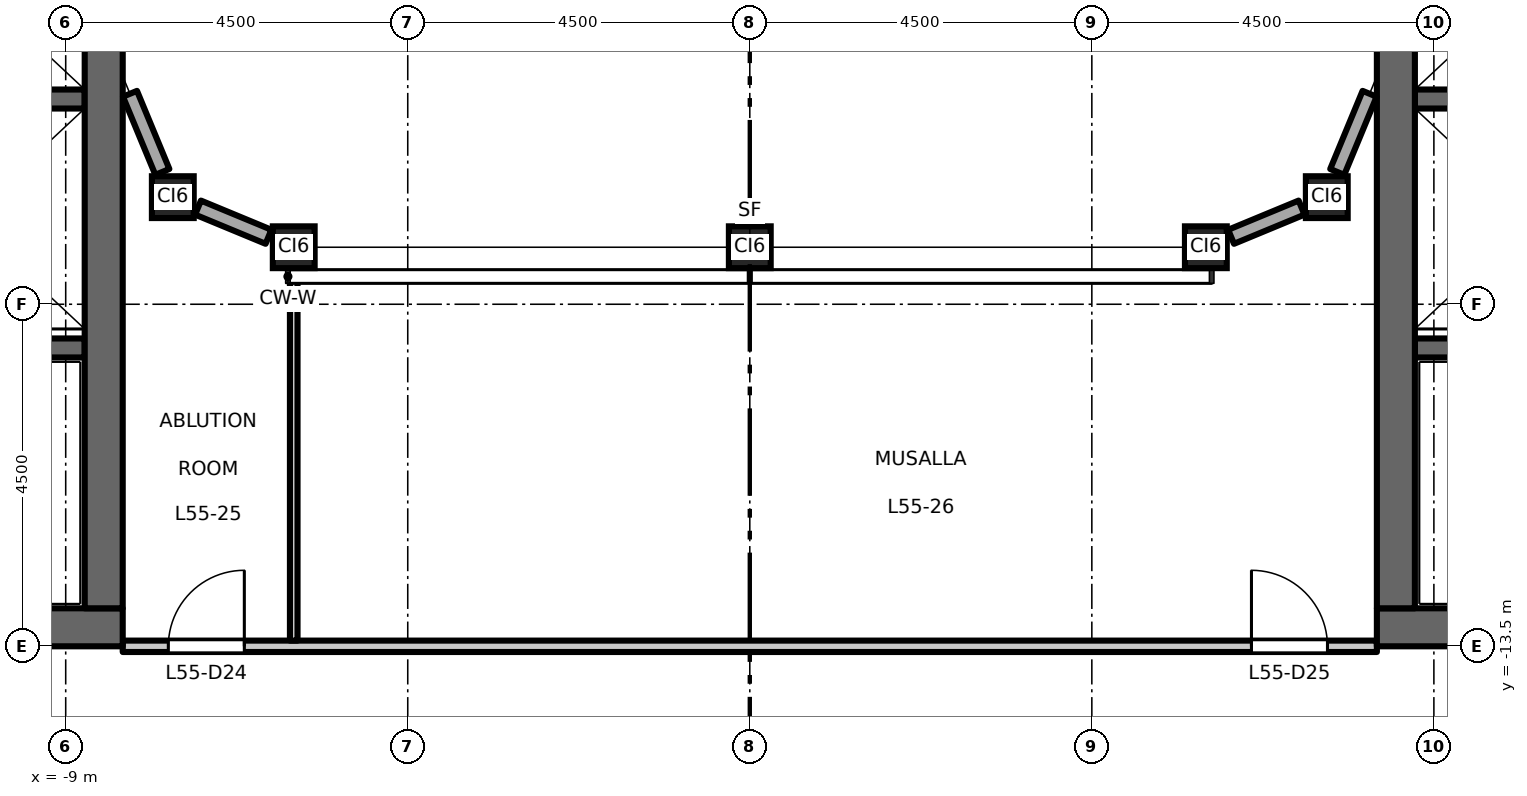
"""IFC4 building model, lengths in metres.
Left out: names, types, materials, properties, quantities, classifications, styles, units other than length and angle.
Written with IfcOpenShell. Run it as: python <this file> out.ifc"""

import sys

from ifc_helpers import new_model, si_unit, direction, frame, frame_2d, origin, origin_2d, place, context, subcontext, project, spatial, rectangle, hollow_rectangle, extrude, element, fill, save


model = new_model("IFC4")
c1 = context("Model", 3, precision=1e-05, world=origin(), true_north=direction((0.0, 1.0)))
c2 = subcontext(c1, "Body", "Model", "MODEL_VIEW")
j1 = project(units=[si_unit("LENGTHUNIT", "METRE"), si_unit("PLANEANGLEUNIT", "RADIAN")], contexts=[c1])
p1 = place(None, origin())
s1 = spatial("IfcSite", under=j1, at=p1, CompositionType="ELEMENT")
p2 = place(p1, origin())
s2 = spatial("IfcBuilding", under=s1, at=p2, CompositionType="ELEMENT")
p3 = place(p2, frame((0.0, 0.0, 255.7)))
s3 = spatial("IfcBuildingStorey", under=s2, at=p3, CompositionType="ELEMENT", Elevation=255.7)
for number, where, z_axis, x_axis in (
    (1, (-7.591, -7.591, 0.0), (0.0, 0.0, 1.0), (1.0, 0.0, 0.0)),
    (2, (-6.0, -8.25, 0.0), (0.0, 0.0, 1.0), (1.0, 0.0, 0.0)),
    (3, (0.0, -8.25, 0.0), (0.0, 0.0, 1.0), (1.0, 0.0, 0.0)),
    (4, (6.0, -8.25, 0.0), (0.0, 0.0, 1.0), (1.0, 0.0, 0.0)),
    (5, (7.591, -7.591, 0.0), (0.0, 0.0, 1.0), (1.0, 0.0, 0.0)),
):
    element("IfcColumn", number, at=place(p3, frame(where, z_axis=z_axis, x_axis=x_axis)), inside=s3, PredefinedType="COLUMN", context=c2, shape_type="SweptSolid", body=[
        extrude(hollow_rectangle(XDim=0.55, YDim=0.55, WallThickness=0.028, at=origin_2d()), origin(), (0.0, 0.0, 1.0), 4.5),
    ])
p4 = place(p3, frame((-8.75, -6.3, 0.0), z_axis=(0.0, 0.0, 1.0), x_axis=(-1.0, 0.0, 0.0)))
e6 = element("IfcWall", 6, at=p4, inside=s3, PredefinedType="SHEAR", context=c2, shape_type="SweptSolid", body=[
    extrude(rectangle(XDim=3.1, YDim=0.25, at=frame_2d((1.55, 0.0))), origin(), (0.0, 0.0, 1.0), 4.35),
])
p5 = place(p3, frame((-8.75, -9.575, 0.0), z_axis=(0.0, 0.0, 1.0), x_axis=(-1.0, 0.0, 0.0)))
e7 = element("IfcWall", 7, at=p5, inside=s3, PredefinedType="SHEAR", context=c2, shape_type="SweptSolid", body=[
    extrude(rectangle(XDim=8.0, YDim=0.25, at=frame_2d((4.0, 0.0))), origin(), (0.0, 0.0, 1.0), 4.35),
])
p6 = place(p5, frame((6.65, 0.0, 0.0)))
e8 = element("IfcOpeningElement", 8, at=p6, cuts=e7, PredefinedType="OPENING", context=c2, shape_type="SweptSolid", body=[
    extrude(rectangle(XDim=1.1, YDim=2.1, at=frame_2d((0.55, 1.05))), frame((0.0, 0.135, 0.0), z_axis=(0.0, -1.0, 0.0), x_axis=(1.0, 0.0, 0.0)), (0.0, 0.0, 1.0), 0.27),
])
p7 = place(p3, frame((-8.25, -13.25, 0.0), z_axis=(0.0, 0.0, 1.0), x_axis=(-1.0, 0.0, 0.0)))
e9 = element("IfcWall", 9, at=p7, inside=s3, PredefinedType="SHEAR", context=c2, shape_type="SweptSolid", body=[
    extrude(rectangle(XDim=13.5, YDim=0.5, at=frame_2d((6.75, 0.0))), origin(), (0.0, 0.0, 1.0), 4.35),
])
p8 = place(p3, frame((-8.5, -13.0, 0.0), z_axis=(0.0, 0.0, 1.0), x_axis=(0.0, 1.0, 0.0)))
e10 = element("IfcWall", 10, at=p8, inside=s3, PredefinedType="SHEAR", context=c2, shape_type="SweptSolid", body=[
    extrude(rectangle(XDim=26.0, YDim=0.5, at=frame_2d((13.0, 0.0))), origin(), (0.0, 0.0, 1.0), 4.35),
])
p9 = place(p3, frame((8.75, -6.3, 0.0), z_axis=(0.0, 0.0, 1.0), x_axis=(1.0, 0.0, 0.0)))
e11 = element("IfcWall", 11, at=p9, inside=s3, PredefinedType="SHEAR", context=c2, shape_type="SweptSolid", body=[
    extrude(rectangle(XDim=3.1, YDim=0.25, at=frame_2d((1.55, 0.0))), origin(), (0.0, 0.0, 1.0), 4.35),
])
p10 = place(p3, frame((8.75, -9.575, 0.0), z_axis=(0.0, 0.0, 1.0), x_axis=(1.0, 0.0, 0.0)))
e12 = element("IfcWall", 12, at=p10, inside=s3, PredefinedType="SHEAR", context=c2, shape_type="SweptSolid", body=[
    extrude(rectangle(XDim=8.0, YDim=0.25, at=frame_2d((4.0, 0.0))), origin(), (0.0, 0.0, 1.0), 4.35),
])
p11 = place(p10, frame((6.65, 0.0, 0.0)))
e13 = element("IfcOpeningElement", 13, at=p11, cuts=e12, PredefinedType="OPENING", context=c2, shape_type="SweptSolid", body=[
    extrude(rectangle(XDim=1.1, YDim=2.1, at=frame_2d((0.55, 1.05))), frame((0.0, 0.135, 0.0), z_axis=(0.0, -1.0, 0.0), x_axis=(1.0, 0.0, 0.0)), (0.0, 0.0, 1.0), 0.27),
])
p12 = place(p3, frame((8.25, -13.25, 0.0), z_axis=(0.0, 0.0, 1.0), x_axis=(1.0, 0.0, 0.0)))
e14 = element("IfcWall", 14, at=p12, inside=s3, PredefinedType="SHEAR", context=c2, shape_type="SweptSolid", body=[
    extrude(rectangle(XDim=13.5, YDim=0.5, at=frame_2d((6.75, 0.0))), origin(), (0.0, 0.0, 1.0), 4.35),
])
p13 = place(p3, frame((8.5, -13.0, 0.0), z_axis=(0.0, 0.0, 1.0), x_axis=(0.0, 1.0, 0.0)))
e15 = element("IfcWall", 15, at=p13, inside=s3, PredefinedType="SHEAR", context=c2, shape_type="SweptSolid", body=[
    extrude(rectangle(XDim=26.0, YDim=0.5, at=frame_2d((13.0, 0.0))), origin(), (0.0, 0.0, 1.0), 4.35),
])
p14 = place(p3, frame((6.332, -8.113, 0.0), z_axis=(0.0, 0.0, 1.0), x_axis=(0.923859650767, 0.382731427616, 0.0)))
e16 = element("IfcWall", 16, at=p14, inside=s3, PredefinedType="STANDARD", context=c2, shape_type="SweptSolid", body=[
    extrude(rectangle(XDim=1.003, YDim=0.2, at=frame_2d((0.502, 0.0))), origin(), (0.0, 0.0, 1.0), 3.918),
])
for number, where, z_axis, x_axis in (
    (17, (7.729, -7.259, 0.0), (0.0, 0.0, 1.0), (0.383, 0.924, 0.0)),
    (18, (-8.154, -6.231, 0.0), (0.0, 0.0, 1.0), (0.383, -0.924, 0.0)),
):
    element("IfcWall", number, at=place(p3, frame(where, z_axis=z_axis, x_axis=x_axis)), inside=s3, PredefinedType="STANDARD", context=c2, shape_type="SweptSolid", body=[
        extrude(rectangle(XDim=1.113, YDim=0.2, at=frame_2d((0.556, 0.0))), origin(), (0.0, 0.0, 1.0), 3.918),
    ])
p15 = place(p3, frame((-7.259, -7.729, 0.0), z_axis=(0.0, 0.0, 1.0), x_axis=(0.923859650767, -0.382731427616, 0.0)))
e19 = element("IfcWall", 19, at=p15, inside=s3, PredefinedType="STANDARD", context=c2, shape_type="SweptSolid", body=[
    extrude(rectangle(XDim=1.003, YDim=0.2, at=frame_2d((0.502, 0.0))), origin(), (0.0, 0.0, 1.0), 3.918),
])
p16 = place(p3, frame((-8.25, -13.5, 0.0), z_axis=(0.0, 0.0, 1.0), x_axis=(1.0, 0.0, 0.0)))
e20 = element("IfcWall", 20, at=p16, inside=s3, PredefinedType="PARTITIONING", context=c2, shape_type="SweptSolid", body=[
    extrude(rectangle(XDim=16.5, YDim=0.15, at=frame_2d((8.25, 0.0))), origin(), (0.0, 0.0, 1.0), 3.95),
])
p17 = place(p16, frame((0.6, 0.0, 0.0)))
e21 = element("IfcOpeningElement", 21, at=p17, cuts=e20, PredefinedType="OPENING", context=c2, shape_type="SweptSolid", body=[
    extrude(rectangle(XDim=1.0, YDim=2.1, at=frame_2d((0.5, 1.05))), frame((0.0, 0.085, 0.0), z_axis=(0.0, -1.0, 0.0), x_axis=(1.0, 0.0, 0.0)), (0.0, 0.0, 1.0), 0.17),
])
p18 = place(p16, frame((14.85, 0.0, 0.0)))
e22 = element("IfcOpeningElement", 22, at=p18, cuts=e20, PredefinedType="OPENING", context=c2, shape_type="SweptSolid", body=[
    extrude(rectangle(XDim=1.0, YDim=2.1, at=frame_2d((0.5, 1.05))), frame((0.0, 0.085, 0.0), z_axis=(0.0, -1.0, 0.0), x_axis=(1.0, 0.0, 0.0)), (0.0, 0.0, 1.0), 0.17),
])
p19 = place(p3, frame((-6.0, -13.425, 0.0), z_axis=(0.0, 0.0, 1.0), x_axis=(0.0, 1.0, 0.0)))
e23 = element("IfcWall", 23, at=p19, inside=s3, PredefinedType="PARTITIONING", context=c2, shape_type="SweptSolid", body=[
    extrude(rectangle(XDim=4.825, YDim=0.1, at=frame_2d((2.413, 0.0))), origin(), (0.0, 0.0, 1.0), 4.35),
])
p20 = place(p17, origin())
e24 = element("IfcDoor", 24, at=p20, inside=s3, OperationType="SINGLE_SWING_RIGHT", PredefinedType="DOOR", context=c2, shape_type="SweptSolid", body=[
    extrude(rectangle(XDim=1.0, YDim=2.1, at=frame_2d((0.5, 1.05))), frame((0.0, 0.025, 0.0), z_axis=(0.0, -1.0, 0.0), x_axis=(1.0, 0.0, 0.0)), (0.0, 0.0, 1.0), 0.05),
])
fill(e21, e24)
p21 = place(p18, origin())
e25 = element("IfcDoor", 25, at=p21, inside=s3, OperationType="SINGLE_SWING_LEFT", PredefinedType="DOOR", context=c2, shape_type="SweptSolid", body=[
    extrude(rectangle(XDim=1.0, YDim=2.1, at=frame_2d((0.5, 1.05))), frame((0.0, 0.025, 0.0), z_axis=(0.0, -1.0, 0.0), x_axis=(1.0, 0.0, 0.0)), (0.0, 0.0, 1.0), 0.05),
])
fill(e22, e25)
save(model, sys.argv[1])
